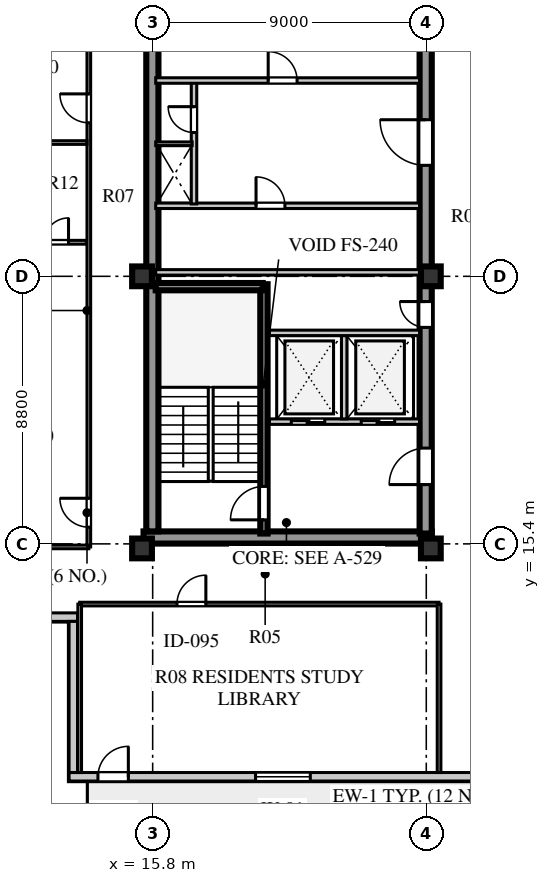
"""IFC4 building model, lengths in metres.
Left out: names, types, materials, properties, quantities, classifications, styles, units other than length and angle.
Written with IfcOpenShell. Run it as: python <this file> out.ifc"""

import sys

from ifc_helpers import new_model, si_unit, direction, frame, frame_2d, origin, origin_2d, place, context, subcontext, project, spatial, rectangle, extrude, element, fill, save


model = new_model("IFC4")
c1 = context("Model", 3, precision=1e-05, world=origin(), true_north=direction((0.0, 1.0)))
c2 = subcontext(c1, "Body", "Model", "MODEL_VIEW")
j1 = project(units=[si_unit("LENGTHUNIT", "METRE"), si_unit("PLANEANGLEUNIT", "RADIAN")], contexts=[c1])
p1 = place(None, origin())
s1 = spatial("IfcSite", under=j1, at=p1, CompositionType="ELEMENT")
p2 = place(p1, origin())
s2 = spatial("IfcBuilding", under=s1, at=p2, CompositionType="ELEMENT")
p3 = place(p2, frame((0.0, 0.0, 221.9)))
s3 = spatial("IfcBuildingStorey", under=s2, at=p3, CompositionType="ELEMENT", Elevation=221.9)
p4 = place(p3, frame((15.5, 15.61, 0.0), z_axis=(0.0, 0.0, 1.0), x_axis=(1.0, 0.0, 0.0)))
e1 = element("IfcWall", 1, at=p4, inside=s3, PredefinedType="SHEAR", context=c2, shape_type="SweptSolid", body=[
    extrude(rectangle(XDim=9.48, YDim=0.4, at=frame_2d((4.74, 0.0))), origin(), (0.0, 0.0, 1.0), 3.66),
])
p5 = place(p3, frame((15.79, 15.81, 0.0), z_axis=(0.0, 0.0, 1.0), x_axis=(0.0, 1.0, 0.0)))
e2 = element("IfcWall", 2, at=p5, inside=s3, PredefinedType="SHEAR", context=c2, shape_type="SweptSolid", body=[
    extrude(rectangle(XDim=25.63, YDim=0.4, at=frame_2d((12.815, 0.0))), origin(), (0.0, 0.0, 1.0), 3.66),
])
p6 = place(p3, frame((24.78, 15.74, 0.0), z_axis=(0.0, 0.0, 1.0), x_axis=(0.0, 1.0, 0.0)))
e3 = element("IfcWall", 3, at=p6, inside=s3, PredefinedType="SHEAR", context=c2, shape_type="SweptSolid", body=[
    extrude(rectangle(XDim=25.76, YDim=0.4, at=frame_2d((12.88, 0.0))), origin(), (0.0, 0.0, 1.0), 3.66),
])
p7 = place(p6, frame((1.61, 0.0, 0.0)))
e4 = element("IfcOpeningElement", 4, at=p7, cuts=e3, PredefinedType="OPENING", context=c2, shape_type="SweptSolid", body=[
    extrude(rectangle(XDim=1.2, YDim=2.1, at=frame_2d((0.6, 1.05))), frame((0.0, 0.21, 0.0), z_axis=(0.0, -1.0, 0.0), x_axis=(1.0, 0.0, 0.0)), (0.0, 0.0, 1.0), 0.42),
])
p8 = place(p6, frame((6.78, 0.0, 0.0)))
e5 = element("IfcOpeningElement", 5, at=p8, cuts=e3, PredefinedType="OPENING", context=c2, shape_type="SweptSolid", body=[
    extrude(rectangle(XDim=0.85, YDim=2.06, at=frame_2d((0.425, 1.03))), frame((0.0, 0.21, 0.0), z_axis=(0.0, -1.0, 0.0), x_axis=(1.0, 0.0, 0.0)), (0.0, 0.0, 1.0), 0.42),
])
p9 = place(p6, frame((12.11, 0.0, 0.0)))
e6 = element("IfcOpeningElement", 6, at=p9, cuts=e3, PredefinedType="OPENING", context=c2, shape_type="SweptSolid", body=[
    extrude(rectangle(XDim=1.5, YDim=2.12, at=frame_2d((0.75, 1.06))), frame((0.0, 0.21, 0.0), z_axis=(0.0, -1.0, 0.0), x_axis=(1.0, 0.0, 0.0)), (0.0, 0.0, 1.0), 0.42),
])
p10 = place(p6, frame((20.11, 0.0, 0.0)))
e7 = element("IfcOpeningElement", 7, at=p10, cuts=e3, PredefinedType="OPENING", context=c2, shape_type="SweptSolid", body=[
    extrude(rectangle(XDim=1.2, YDim=2.12, at=frame_2d((0.6, 1.06))), frame((0.0, 0.21, 0.0), z_axis=(0.0, -1.0, 0.0), x_axis=(1.0, 0.0, 0.0)), (0.0, 0.0, 1.0), 0.42),
])
p11 = place(p6, frame((24.01, 0.0, 0.0)))
e8 = element("IfcOpeningElement", 8, at=p11, cuts=e3, PredefinedType="OPENING", context=c2, shape_type="SweptSolid", body=[
    extrude(rectangle(XDim=0.95, YDim=2.1, at=frame_2d((0.475, 1.05))), frame((0.0, 0.21, 0.0), z_axis=(0.0, -1.0, 0.0), x_axis=(1.0, 0.0, 0.0)), (0.0, 0.0, 1.0), 0.42),
])
for number, where, z_axis, x_axis in (
    (9, (15.45, 15.25, 0.0), (0.0, 0.0, 1.0), (1.0, 0.0, 0.0)),
    (10, (15.45, 24.2, 0.0), (0.0, 0.0, 1.0), (1.0, 0.0, 0.0)),
    (11, (24.95, 15.25, 0.0), (0.0, 0.0, 1.0), (1.0, 0.0, 0.0)),
    (12, (24.95, 24.2, 0.0), (0.0, 0.0, 1.0), (1.0, 0.0, 0.0)),
):
    element("IfcColumn", number, at=place(p3, frame(where, z_axis=z_axis, x_axis=x_axis)), inside=s3, PredefinedType="COLUMN", context=c2, shape_type="SweptSolid", body=[
        extrude(rectangle(XDim=0.65, YDim=0.65, at=origin_2d()), origin(), (0.0, 0.0, 1.0), 3.66),
    ])
p12 = place(p3, frame((13.05, 7.74, 0.0), z_axis=(0.0, 0.0, 1.0), x_axis=(1.0, 0.0, 0.0)))
e13 = element("IfcWall", 13, at=p12, inside=s3, PredefinedType="STANDARD", context=c2, shape_type="SweptSolid", body=[
    extrude(rectangle(XDim=32.5, YDim=0.28, at=frame_2d((16.25, 0.0))), origin(), (0.0, 0.0, 1.0), 3.66),
])
p13 = place(p12, frame((0.95, 0.0, 0.0)))
e14 = element("IfcOpeningElement", 14, at=p13, cuts=e13, PredefinedType="OPENING", context=c2, shape_type="SweptSolid", body=[
    extrude(rectangle(XDim=1.0, YDim=2.05, at=frame_2d((0.5, 1.025))), frame((0.0, 0.15, 0.0), z_axis=(0.0, -1.0, 0.0), x_axis=(1.0, 0.0, 0.0)), (0.0, 0.0, 1.0), 0.3),
])
p14 = place(p12, frame((6.135, 0.0, 0.8)))
e15 = element("IfcOpeningElement", 15, at=p14, cuts=e13, PredefinedType="OPENING", context=c2, shape_type="SweptSolid", body=[
    extrude(rectangle(XDim=1.8, YDim=2.0, at=frame_2d((0.9, 1.0))), frame((0.0, 0.15, 0.0), z_axis=(0.0, -1.0, 0.0), x_axis=(1.0, 0.0, 0.0)), (0.0, 0.0, 1.0), 0.3),
])
p15 = place(p12, frame((14.802, 0.0, 0.8)))
e16 = element("IfcOpeningElement", 16, at=p15, cuts=e13, PredefinedType="OPENING", context=c2, shape_type="SweptSolid", body=[
    extrude(rectangle(XDim=1.5, YDim=2.0, at=frame_2d((0.75, 1.0))), frame((0.0, 0.15, 0.0), z_axis=(0.0, -1.0, 0.0), x_axis=(1.0, 0.0, 0.0)), (0.0, 0.0, 1.0), 0.3),
])
p16 = place(p12, frame((20.988, 0.0, 0.8)))
e17 = element("IfcOpeningElement", 17, at=p16, cuts=e13, PredefinedType="OPENING", context=c2, shape_type="SweptSolid", body=[
    extrude(rectangle(XDim=1.2, YDim=1.75, at=frame_2d((0.6, 0.875))), frame((0.0, 0.15, 0.0), z_axis=(0.0, -1.0, 0.0), x_axis=(1.0, 0.0, 0.0)), (0.0, 0.0, 1.0), 0.3),
])
p17 = place(p12, frame((28.045, 0.0, 0.8)))
e18 = element("IfcOpeningElement", 18, at=p17, cuts=e13, PredefinedType="OPENING", context=c2, shape_type="SweptSolid", body=[
    extrude(rectangle(XDim=2.4, YDim=2.05, at=frame_2d((1.2, 1.025))), frame((0.0, 0.15, 0.0), z_axis=(0.0, -1.0, 0.0), x_axis=(1.0, 0.0, 0.0)), (0.0, 0.0, 1.0), 0.3),
])
p18 = place(p3, frame((7.8, 12.99, 0.0), z_axis=(0.0, 0.0, 1.0), x_axis=(1.0, 0.0, 0.0)))
e19 = element("IfcWall", 19, at=p18, inside=s3, PredefinedType="STANDARD", context=c2, shape_type="SweptSolid", body=[
    extrude(rectangle(XDim=5.53, YDim=0.28, at=frame_2d((2.765, 0.0))), origin(), (0.0, 0.0, 1.0), 3.66),
])
p19 = place(p3, frame((13.19, 12.85, 0.0), z_axis=(0.0, 0.0, 1.0), x_axis=(0.0, -1.0, 0.0)))
e20 = element("IfcWall", 20, at=p19, inside=s3, PredefinedType="STANDARD", context=c2, shape_type="SweptSolid", body=[
    extrude(rectangle(XDim=4.97, YDim=0.28, at=frame_2d((2.485, 0.0))), origin(), (0.0, 0.0, 1.0), 3.66),
])
p20 = place(p3, frame((19.46, 15.74, 0.0), z_axis=(0.0, 0.0, 1.0), x_axis=(0.0, 1.0, 0.0)))
e21 = element("IfcWall", 21, at=p20, inside=s3, PredefinedType="SHEAR", context=c2, shape_type="SweptSolid", body=[
    extrude(rectangle(XDim=8.2, YDim=0.24, at=frame_2d((4.1, 0.0))), origin(), (0.0, 0.0, 1.0), 3.9),
])
p21 = place(p20, frame((0.45, 0.0, 0.0)))
e22 = element("IfcOpeningElement", 22, at=p21, cuts=e21, PredefinedType="OPENING", context=c2, shape_type="SweptSolid", body=[
    extrude(rectangle(XDim=1.1, YDim=2.1, at=frame_2d((0.55, 1.05))), frame((0.0, 0.13, 0.0), z_axis=(0.0, -1.0, 0.0), x_axis=(1.0, 0.0, 0.0)), (0.0, 0.0, 1.0), 0.26),
])
p22 = place(p3, frame((15.9, 23.86, 0.0), z_axis=(0.0, 0.0, 1.0), x_axis=(1.0, 0.0, 0.0)))
e23 = element("IfcWall", 23, at=p22, inside=s3, PredefinedType="SHEAR", context=c2, shape_type="SweptSolid", body=[
    extrude(rectangle(XDim=3.52, YDim=0.24, at=frame_2d((1.76, 0.0))), origin(), (0.0, 0.0, 1.0), 3.9),
])
p23 = place(p3, frame((19.64, 19.42, 0.0), z_axis=(0.0, 0.0, 1.0), x_axis=(1.0, 0.0, 0.0)))
e24 = element("IfcWall", 24, at=p23, inside=s3, PredefinedType="SOLIDWALL", context=c2, shape_type="SweptSolid", body=[
    extrude(rectangle(XDim=4.94, YDim=0.18, at=frame_2d((2.47, 0.0))), origin(), (0.0, 0.0, 1.0), 3.66),
])
p24 = place(p23, frame((0.72, 0.0, 0.0)))
e25 = element("IfcOpeningElement", 25, at=p24, cuts=e24, PredefinedType="OPENING", context=c2, shape_type="SweptSolid", body=[
    extrude(rectangle(XDim=1.1, YDim=2.1, at=frame_2d((0.55, 1.05))), frame((0.0, 0.1, 0.0), z_axis=(0.0, -1.0, 0.0), x_axis=(1.0, 0.0, 0.0)), (0.0, 0.0, 1.0), 0.2),
])
p25 = place(p23, frame((3.02, 0.0, 0.0)))
e26 = element("IfcOpeningElement", 26, at=p25, cuts=e24, PredefinedType="OPENING", context=c2, shape_type="SweptSolid", body=[
    extrude(rectangle(XDim=1.1, YDim=2.1, at=frame_2d((0.55, 1.05))), frame((0.0, 0.1, 0.0), z_axis=(0.0, -1.0, 0.0), x_axis=(1.0, 0.0, 0.0)), (0.0, 0.0, 1.0), 0.2),
])
p26 = place(p3, frame((22.1, 19.51, 0.0), z_axis=(0.0, 0.0, 1.0), x_axis=(0.0, 1.0, 0.0)))
e27 = element("IfcWall", 27, at=p26, inside=s3, PredefinedType="SOLIDWALL", context=c2, shape_type="SweptSolid", body=[
    extrude(rectangle(XDim=2.74, YDim=0.18, at=frame_2d((1.37, 0.0))), origin(), (0.0, 0.0, 1.0), 3.66),
])
p27 = place(p3, frame((19.64, 22.34, 0.0), z_axis=(0.0, 0.0, 1.0), x_axis=(1.0, 0.0, 0.0)))
e28 = element("IfcWall", 28, at=p27, inside=s3, PredefinedType="SOLIDWALL", context=c2, shape_type="SweptSolid", body=[
    extrude(rectangle(XDim=4.94, YDim=0.18, at=frame_2d((2.47, 0.0))), origin(), (0.0, 0.0, 1.0), 3.66),
])
p28 = place(p3, frame((15.9, 26.52, 0.0), z_axis=(0.0, 0.0, 1.0), x_axis=(1.0, 0.0, 0.0)))
e29 = element("IfcWall", 29, at=p28, inside=s3, PredefinedType="SOLIDWALL", context=c2, shape_type="SweptSolid", body=[
    extrude(rectangle(XDim=8.68, YDim=0.18, at=frame_2d((4.34, 0.0))), origin(), (0.0, 0.0, 1.0), 3.66),
])
p29 = place(p28, frame((3.3, 0.0, 0.0)))
e30 = element("IfcOpeningElement", 30, at=p29, cuts=e29, PredefinedType="OPENING", context=c2, shape_type="SweptSolid", body=[
    extrude(rectangle(XDim=0.95, YDim=2.1, at=frame_2d((0.475, 1.05))), frame((0.0, 0.1, 0.0), z_axis=(0.0, -1.0, 0.0), x_axis=(1.0, 0.0, 0.0)), (0.0, 0.0, 1.0), 0.2),
])
p30 = place(p3, frame((15.9, 24.33, 0.0), z_axis=(0.0, 0.0, 1.0), x_axis=(1.0, 0.0, 0.0)))
e31 = element("IfcWall", 31, at=p30, inside=s3, PredefinedType="SOLIDWALL", context=c2, shape_type="SweptSolid", body=[
    extrude(rectangle(XDim=8.68, YDim=0.18, at=frame_2d((4.34, 0.0))), origin(), (0.0, 0.0, 1.0), 3.06),
])
p31 = place(p3, frame((17.16, 26.58, 0.0), z_axis=(0.0, 0.0, 1.0), x_axis=(0.0, 1.0, 0.0)))
e32 = element("IfcWall", 32, at=p31, inside=s3, PredefinedType="SOLIDWALL", context=c2, shape_type="SweptSolid", body=[
    extrude(rectangle(XDim=4.02, YDim=0.18, at=frame_2d((2.01, 0.0))), origin(), (0.0, 0.0, 1.0), 3.66),
])
p32 = place(p31, frame((2.35, 0.0, 0.0)))
e33 = element("IfcOpeningElement", 33, at=p32, cuts=e32, PredefinedType="OPENING", context=c2, shape_type="SweptSolid", body=[
    extrude(rectangle(XDim=0.85, YDim=2.06, at=frame_2d((0.425, 1.03))), frame((0.0, 0.1, 0.0), z_axis=(0.0, -1.0, 0.0), x_axis=(1.0, 0.0, 0.0)), (0.0, 0.0, 1.0), 0.2),
])
p33 = place(p3, frame((15.9, 28.56, 0.0), z_axis=(0.0, 0.0, 1.0), x_axis=(1.0, 0.0, 0.0)))
e34 = element("IfcWall", 34, at=p33, inside=s3, PredefinedType="PARTITIONING", context=c2, shape_type="SweptSolid", body=[
    extrude(rectangle(XDim=1.2, YDim=0.12, at=frame_2d((0.6, 0.0))), origin(), (0.0, 0.0, 1.0), 3.66),
])
p34 = place(p3, frame((15.9, 30.64, 0.0), z_axis=(0.0, 0.0, 1.0), x_axis=(1.0, 0.0, 0.0)))
e35 = element("IfcWall", 35, at=p34, inside=s3, PredefinedType="SOLIDWALL", context=c2, shape_type="SweptSolid", body=[
    extrude(rectangle(XDim=8.68, YDim=0.18, at=frame_2d((4.34, 0.0))), origin(), (0.0, 0.0, 1.0), 3.66),
])
p35 = place(p34, frame((3.7, 0.0, 0.0)))
e36 = element("IfcOpeningElement", 36, at=p35, cuts=e35, PredefinedType="OPENING", context=c2, shape_type="SweptSolid", body=[
    extrude(rectangle(XDim=0.95, YDim=2.1, at=frame_2d((0.475, 1.05))), frame((0.0, 0.1, 0.0), z_axis=(0.0, -1.0, 0.0), x_axis=(1.0, 0.0, 0.0)), (0.0, 0.0, 1.0), 0.2),
])
p36 = place(p3, frame((13.4, 13.42, 0.0), z_axis=(0.0, 0.0, 1.0), x_axis=(1.0, 0.0, 0.0)))
e37 = element("IfcWall", 37, at=p36, inside=s3, PredefinedType="PARTITIONING", context=c2, shape_type="SweptSolid", body=[
    extrude(rectangle(XDim=11.82, YDim=0.12, at=frame_2d((5.91, 0.0))), origin(), (0.0, 0.0, 1.0), 3.66),
])
p37 = place(p36, frame((3.2, 0.0, 0.0)))
e38 = element("IfcOpeningElement", 38, at=p37, cuts=e37, PredefinedType="OPENING", context=c2, shape_type="SweptSolid", body=[
    extrude(rectangle(XDim=0.95, YDim=2.08, at=frame_2d((0.475, 1.04))), frame((0.0, 0.07, 0.0), z_axis=(0.0, -1.0, 0.0), x_axis=(1.0, 0.0, 0.0)), (0.0, 0.0, 1.0), 0.14),
])
p38 = place(p3, frame((13.4, 7.88, 0.0), z_axis=(0.0, 0.0, 1.0), x_axis=(0.0, 1.0, 0.0)))
e39 = element("IfcWall", 39, at=p38, inside=s3, PredefinedType="PARTITIONING", context=c2, shape_type="SweptSolid", body=[
    extrude(rectangle(XDim=5.54, YDim=0.12, at=frame_2d((2.77, 0.0))), origin(), (0.0, 0.0, 1.0), 3.66),
])
p39 = place(p3, frame((25.22, 7.88, 0.0), z_axis=(0.0, 0.0, 1.0), x_axis=(0.0, 1.0, 0.0)))
e40 = element("IfcWall", 40, at=p39, inside=s3, PredefinedType="PARTITIONING", context=c2, shape_type="SweptSolid", body=[
    extrude(rectangle(XDim=5.54, YDim=0.12, at=frame_2d((2.77, 0.0))), origin(), (0.0, 0.0, 1.0), 3.21),
])
p40 = place(p3, frame((13.7, 15.3, 0.0), z_axis=(0.0, 0.0, 1.0), x_axis=(0.0, 1.0, 0.0)))
e41 = element("IfcWall", 41, at=p40, inside=s3, PredefinedType="PARTITIONING", context=c2, shape_type="SweptSolid", body=[
    extrude(rectangle(XDim=26.6, YDim=0.12, at=frame_2d((13.3, 0.0))), origin(), (0.0, 0.0, 1.0), 3.66),
])
p41 = place(p40, frame((0.65, 0.0, 0.0)))
e42 = element("IfcOpeningElement", 42, at=p41, cuts=e41, PredefinedType="OPENING", context=c2, shape_type="SweptSolid", body=[
    extrude(rectangle(XDim=0.95, YDim=2.1, at=frame_2d((0.475, 1.05))), frame((0.0, 0.07, 0.0), z_axis=(0.0, -1.0, 0.0), x_axis=(1.0, 0.0, 0.0)), (0.0, 0.0, 1.0), 0.14),
])
p42 = place(p40, frame((13.95, 0.0, 0.0)))
e43 = element("IfcOpeningElement", 43, at=p42, cuts=e41, PredefinedType="OPENING", context=c2, shape_type="SweptSolid", body=[
    extrude(rectangle(XDim=0.95, YDim=2.1, at=frame_2d((0.475, 1.05))), frame((0.0, 0.07, 0.0), z_axis=(0.0, -1.0, 0.0), x_axis=(1.0, 0.0, 0.0)), (0.0, 0.0, 1.0), 0.14),
])
p43 = place(p3, frame((8.08, 15.3, 0.0), z_axis=(0.0, 0.0, 1.0), x_axis=(1.0, 0.0, 0.0)))
e44 = element("IfcWall", 44, at=p43, inside=s3, PredefinedType="PARTITIONING", context=c2, shape_type="SweptSolid", body=[
    extrude(rectangle(XDim=5.62, YDim=0.12, at=frame_2d((2.81, 0.0))), origin(), (0.0, 0.0, 1.0), 3.21),
])
p44 = place(p3, frame((10.45, 25.32, 0.0), z_axis=(0.0, 0.0, 1.0), x_axis=(1.0, 0.0, 0.0)))
e45 = element("IfcWall", 45, at=p44, inside=s3, PredefinedType="PLUMBINGWALL", context=c2, shape_type="SweptSolid", body=[
    extrude(rectangle(XDim=3.17, YDim=0.125, at=frame_2d((1.585, 0.0))), origin(), (0.0, 0.0, 1.0), 3.66),
])
p45 = place(p44, frame((0.16, 0.0, 0.0)))
e46 = element("IfcOpeningElement", 46, at=p45, cuts=e45, PredefinedType="OPENING", context=c2, shape_type="SweptSolid", body=[
    extrude(rectangle(XDim=0.8, YDim=2.05, at=frame_2d((0.4, 1.025))), frame((0.0, 0.073, 0.0), z_axis=(0.0, -1.0, 0.0), x_axis=(1.0, 0.0, 0.0)), (0.0, 0.0, 1.0), 0.145),
])
p46 = place(p44, frame((1.782, 0.0, 0.0)))
e47 = element("IfcOpeningElement", 47, at=p46, cuts=e45, PredefinedType="OPENING", context=c2, shape_type="SweptSolid", body=[
    extrude(rectangle(XDim=0.8, YDim=2.05, at=frame_2d((0.4, 1.025))), frame((0.0, 0.073, 0.0), z_axis=(0.0, -1.0, 0.0), x_axis=(1.0, 0.0, 0.0)), (0.0, 0.0, 1.0), 0.145),
])
p47 = place(p3, frame((8.08, 28.6, 0.0), z_axis=(0.0, 0.0, 1.0), x_axis=(1.0, 0.0, 0.0)))
e48 = element("IfcWall", 48, at=p47, inside=s3, PredefinedType="PARTITIONING", context=c2, shape_type="SweptSolid", body=[
    extrude(rectangle(XDim=5.56, YDim=0.12, at=frame_2d((2.78, 0.0))), origin(), (0.0, 0.0, 1.0), 3.66),
])
p48 = place(p13, frame((1.0, 0.0, 0.0), z_axis=(0.0, 0.0, 1.0), x_axis=(-1.0, 0.0, 0.0)))
e49 = element("IfcDoor", 49, at=p48, inside=s3, OperationType="SINGLE_SWING_LEFT", PredefinedType="DOOR", context=c2, shape_type="SweptSolid", body=[
    extrude(rectangle(XDim=1.0, YDim=2.05, at=frame_2d((0.5, 1.025))), frame((0.0, 0.025, 0.0), z_axis=(0.0, -1.0, 0.0), x_axis=(1.0, 0.0, 0.0)), (0.0, 0.0, 1.0), 0.05),
])
fill(e14, e49)
p49 = place(p14, origin())
e50 = element("IfcWindow", 50, at=p49, inside=s3, PartitioningType="SINGLE_PANEL", PredefinedType="WINDOW", context=c2, shape_type="SweptSolid", body=[
    extrude(rectangle(XDim=1.8, YDim=2.0, at=frame_2d((0.9, 1.0))), frame((0.0, 0.03, 0.0), z_axis=(0.0, -1.0, 0.0), x_axis=(1.0, 0.0, 0.0)), (0.0, 0.0, 1.0), 0.06),
])
fill(e15, e50)
p50 = place(p21, origin())
e51 = element("IfcDoor", 51, at=p50, inside=s3, OperationType="SINGLE_SWING_LEFT", PredefinedType="DOOR", context=c2, shape_type="SweptSolid", body=[
    extrude(rectangle(XDim=1.1, YDim=2.1, at=frame_2d((0.55, 1.05))), frame((0.0, 0.025, 0.0), z_axis=(0.0, -1.0, 0.0), x_axis=(1.0, 0.0, 0.0)), (0.0, 0.0, 1.0), 0.05),
])
fill(e22, e51)
p51 = place(p24, origin())
e52 = element("IfcDoor", 52, at=p51, inside=s3, OperationType="DOUBLE_DOOR_SLIDING", PredefinedType="DOOR", context=c2, shape_type="SweptSolid", body=[
    extrude(rectangle(XDim=1.1, YDim=2.1, at=frame_2d((0.55, 1.05))), frame((0.0, 0.025, 0.0), z_axis=(0.0, -1.0, 0.0), x_axis=(1.0, 0.0, 0.0)), (0.0, 0.0, 1.0), 0.05),
])
fill(e25, e52)
p52 = place(p25, origin())
e53 = element("IfcDoor", 53, at=p52, inside=s3, OperationType="DOUBLE_DOOR_SLIDING", PredefinedType="DOOR", context=c2, shape_type="SweptSolid", body=[
    extrude(rectangle(XDim=1.1, YDim=2.1, at=frame_2d((0.55, 1.05))), frame((0.0, 0.025, 0.0), z_axis=(0.0, -1.0, 0.0), x_axis=(1.0, 0.0, 0.0)), (0.0, 0.0, 1.0), 0.05),
])
fill(e26, e53)
p53 = place(p7, frame((1.2, 0.0, 0.0), z_axis=(0.0, 0.0, 1.0), x_axis=(-1.0, 0.0, 0.0)))
e54 = element("IfcDoor", 54, at=p53, inside=s3, OperationType="SINGLE_SWING_RIGHT", PredefinedType="DOOR", context=c2, shape_type="SweptSolid", body=[
    extrude(rectangle(XDim=1.2, YDim=2.1, at=frame_2d((0.6, 1.05))), frame((0.0, 0.025, 0.0), z_axis=(0.0, -1.0, 0.0), x_axis=(1.0, 0.0, 0.0)), (0.0, 0.0, 1.0), 0.05),
])
fill(e4, e54)
p54 = place(p8, frame((0.85, 0.0, 0.0), z_axis=(0.0, 0.0, 1.0), x_axis=(-1.0, 0.0, 0.0)))
e55 = element("IfcDoor", 55, at=p54, inside=s3, OperationType="SINGLE_SWING_LEFT", PredefinedType="DOOR", context=c2, shape_type="SweptSolid", body=[
    extrude(rectangle(XDim=0.85, YDim=2.06, at=frame_2d((0.425, 1.03))), frame((0.0, 0.025, 0.0), z_axis=(0.0, -1.0, 0.0), x_axis=(1.0, 0.0, 0.0)), (0.0, 0.0, 1.0), 0.05),
])
fill(e5, e55)
p55 = place(p29, origin())
e56 = element("IfcDoor", 56, at=p55, inside=s3, OperationType="SINGLE_SWING_LEFT", PredefinedType="DOOR", context=c2, shape_type="SweptSolid", body=[
    extrude(rectangle(XDim=0.95, YDim=2.1, at=frame_2d((0.475, 1.05))), frame((0.0, 0.025, 0.0), z_axis=(0.0, -1.0, 0.0), x_axis=(1.0, 0.0, 0.0)), (0.0, 0.0, 1.0), 0.05),
])
fill(e30, e56)
p56 = place(p32, origin())
e57 = element("IfcDoor", 57, at=p56, inside=s3, OperationType="SINGLE_SWING_RIGHT", PredefinedType="DOOR", context=c2, shape_type="SweptSolid", body=[
    extrude(rectangle(XDim=0.85, YDim=2.06, at=frame_2d((0.425, 1.03))), frame((0.0, 0.025, 0.0), z_axis=(0.0, -1.0, 0.0), x_axis=(1.0, 0.0, 0.0)), (0.0, 0.0, 1.0), 0.05),
])
fill(e33, e57)
p57 = place(p9, frame((1.5, 0.0, 0.0), z_axis=(0.0, 0.0, 1.0), x_axis=(-1.0, 0.0, 0.0)))
e58 = element("IfcDoor", 58, at=p57, inside=s3, OperationType="SINGLE_SWING_LEFT", PredefinedType="DOOR", context=c2, shape_type="SweptSolid", body=[
    extrude(rectangle(XDim=1.5, YDim=2.12, at=frame_2d((0.75, 1.06))), frame((0.0, 0.025, 0.0), z_axis=(0.0, -1.0, 0.0), x_axis=(1.0, 0.0, 0.0)), (0.0, 0.0, 1.0), 0.05),
])
fill(e6, e58)
p58 = place(p35, frame((0.95, 0.0, 0.0), z_axis=(0.0, 0.0, 1.0), x_axis=(-1.0, 0.0, 0.0)))
e59 = element("IfcDoor", 59, at=p58, inside=s3, OperationType="SINGLE_SWING_RIGHT", PredefinedType="DOOR", context=c2, shape_type="SweptSolid", body=[
    extrude(rectangle(XDim=0.95, YDim=2.1, at=frame_2d((0.475, 1.05))), frame((0.0, 0.025, 0.0), z_axis=(0.0, -1.0, 0.0), x_axis=(1.0, 0.0, 0.0)), (0.0, 0.0, 1.0), 0.05),
])
fill(e36, e59)
p59 = place(p37, frame((0.95, 0.0, 0.0), z_axis=(0.0, 0.0, 1.0), x_axis=(-1.0, 0.0, 0.0)))
e60 = element("IfcDoor", 60, at=p59, inside=s3, OperationType="SINGLE_SWING_LEFT", PredefinedType="DOOR", context=c2, shape_type="SweptSolid", body=[
    extrude(rectangle(XDim=0.95, YDim=2.08, at=frame_2d((0.475, 1.04))), frame((0.0, 0.025, 0.0), z_axis=(0.0, -1.0, 0.0), x_axis=(1.0, 0.0, 0.0)), (0.0, 0.0, 1.0), 0.05),
])
fill(e38, e60)
p60 = place(p46, origin())
e61 = element("IfcDoor", 61, at=p60, inside=s3, OperationType="SINGLE_SWING_RIGHT", PredefinedType="DOOR", context=c2, shape_type="SweptSolid", body=[
    extrude(rectangle(XDim=0.8, YDim=2.05, at=frame_2d((0.4, 1.025))), frame((0.0, 0.025, 0.0), z_axis=(0.0, -1.0, 0.0), x_axis=(1.0, 0.0, 0.0)), (0.0, 0.0, 1.0), 0.05),
])
fill(e47, e61)
p61 = place(p41, frame((0.95, 0.0, 0.0), z_axis=(0.0, 0.0, 1.0), x_axis=(-1.0, 0.0, 0.0)))
e62 = element("IfcDoor", 62, at=p61, inside=s3, OperationType="SINGLE_SWING_LEFT", PredefinedType="DOOR", context=c2, shape_type="SweptSolid", body=[
    extrude(rectangle(XDim=0.95, YDim=2.1, at=frame_2d((0.475, 1.05))), frame((0.0, 0.025, 0.0), z_axis=(0.0, -1.0, 0.0), x_axis=(1.0, 0.0, 0.0)), (0.0, 0.0, 1.0), 0.05),
])
fill(e42, e62)
p62 = place(p42, frame((0.95, 0.0, 0.0), z_axis=(0.0, 0.0, 1.0), x_axis=(-1.0, 0.0, 0.0)))
e63 = element("IfcDoor", 63, at=p62, inside=s3, OperationType="SINGLE_SWING_LEFT", PredefinedType="DOOR", context=c2, shape_type="SweptSolid", body=[
    extrude(rectangle(XDim=0.95, YDim=2.1, at=frame_2d((0.475, 1.05))), frame((0.0, 0.025, 0.0), z_axis=(0.0, -1.0, 0.0), x_axis=(1.0, 0.0, 0.0)), (0.0, 0.0, 1.0), 0.05),
])
fill(e43, e63)
save(model, sys.argv[1])
